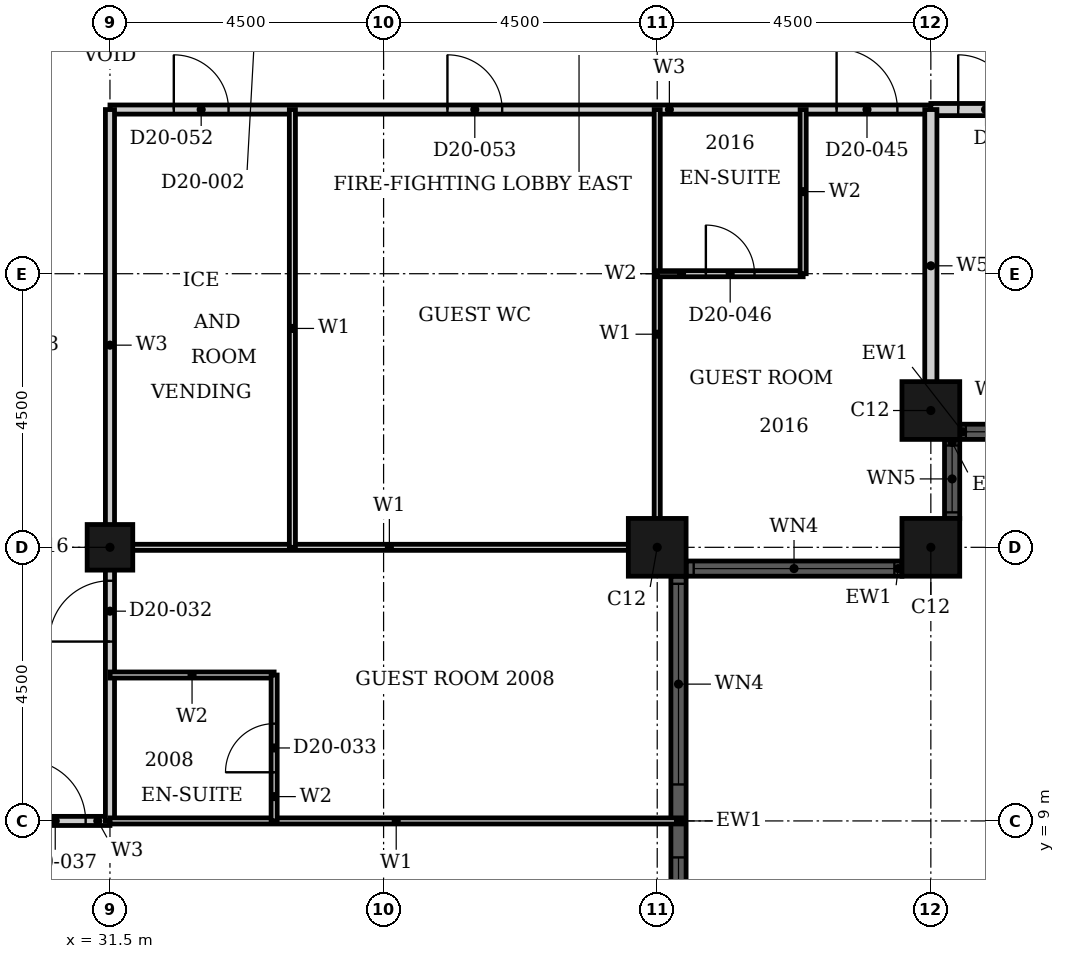
"""IFC4 building model, lengths in metres.
Left out: names, types, materials, properties, quantities, classifications, styles, units other than length and angle.
Written with IfcOpenShell. Run it as: python <this file> out.ifc"""

import sys

from ifc_helpers import new_model, si_unit, direction, frame, frame_2d, origin, origin_2d, place, context, subcontext, project, spatial, rectangle, hollow_rectangle, extrude, element, fill, save


model = new_model("IFC4")
c1 = context("Model", 3, precision=1e-05, world=origin(), true_north=direction((0.0, 1.0)))
c2 = subcontext(c1, "Body", "Model", "MODEL_VIEW")
j1 = project(units=[si_unit("LENGTHUNIT", "METRE"), si_unit("PLANEANGLEUNIT", "RADIAN")], contexts=[c1])
p1 = place(None, origin())
s1 = spatial("IfcSite", under=j1, at=p1, CompositionType="ELEMENT")
p2 = place(p1, origin())
s2 = spatial("IfcBuilding", under=s1, at=p2, CompositionType="ELEMENT")
p3 = place(p2, frame((0.0, 0.0, 85.2)))
s3 = spatial("IfcBuildingStorey", under=s2, at=p3, CompositionType="ELEMENT", Elevation=85.2)
for number, where, z_axis, x_axis in (
    (1, (40.5, 13.5, 0.0), (0.0, 0.0, 1.0), (1.0, 0.0, 0.0)),
    (2, (45.0, 13.5, 0.0), (0.0, 0.0, 1.0), (1.0, 0.0, 0.0)),
    (3, (45.0, 15.75, 0.0), (0.0, 0.0, 1.0), (1.0, 0.0, 0.0)),
):
    element("IfcColumn", number, at=place(p3, frame(where, z_axis=z_axis, x_axis=x_axis)), inside=s3, PredefinedType="COLUMN", context=c2, shape_type="SweptSolid", body=[
        extrude(hollow_rectangle(XDim=0.95, YDim=0.95, WallThickness=0.03, at=origin_2d()), origin(), (0.0, 0.0, 1.0), 3.6),
    ])
p4 = place(p3, frame((31.5, 13.5, 0.0), z_axis=(0.0, 0.0, 1.0), x_axis=(1.0, 0.0, 0.0)))
e4 = element("IfcColumn", 4, at=p4, inside=s3, PredefinedType="COLUMN", context=c2, shape_type="SweptSolid", body=[
    extrude(hollow_rectangle(XDim=0.75, YDim=0.75, WallThickness=0.024, at=origin_2d()), origin(), (0.0, 0.0, 1.0), 3.6),
])
p5 = place(p3, frame((40.85, 4.975, 0.0), z_axis=(0.0, 0.0, 1.0), x_axis=(0.0, 1.0, 0.0)))
e5 = element("IfcWall", 5, at=p5, inside=s3, PredefinedType="SOLIDWALL", context=c2, shape_type="SweptSolid", body=[
    extrude(rectangle(XDim=8.05, YDim=0.25, at=frame_2d((4.025, 0.0))), origin(), (0.0, 0.0, 1.0), 3.6),
])
p6 = place(p5, frame((0.125, 0.0, 0.9)))
e6 = element("IfcOpeningElement", 6, at=p6, cuts=e5, PredefinedType="OPENING", context=c2, shape_type="SweptSolid", body=[
    extrude(rectangle(XDim=3.3, YDim=2.08, at=frame_2d((1.65, 1.04))), frame((0.0, 0.135, 0.0), z_axis=(0.0, -1.0, 0.0), x_axis=(1.0, 0.0, 0.0)), (0.0, 0.0, 1.0), 0.27),
])
p7 = place(p5, frame((4.625, 0.0, 0.9)))
e7 = element("IfcOpeningElement", 7, at=p7, cuts=e5, PredefinedType="OPENING", context=c2, shape_type="SweptSolid", body=[
    extrude(rectangle(XDim=3.3, YDim=2.08, at=frame_2d((1.65, 1.04))), frame((0.0, 0.135, 0.0), z_axis=(0.0, -1.0, 0.0), x_axis=(1.0, 0.0, 0.0)), (0.0, 0.0, 1.0), 0.27),
])
p8 = place(p3, frame((40.975, 13.15, 0.0), z_axis=(0.0, 0.0, 1.0), x_axis=(1.0, 0.0, 0.0)))
e8 = element("IfcWall", 8, at=p8, inside=s3, PredefinedType="SOLIDWALL", context=c2, shape_type="SweptSolid", body=[
    extrude(rectangle(XDim=3.55, YDim=0.25, at=frame_2d((1.775, 0.0))), origin(), (0.0, 0.0, 1.0), 3.6),
])
p9 = place(p8, frame((0.125, 0.0, 0.9)))
e9 = element("IfcOpeningElement", 9, at=p9, cuts=e8, PredefinedType="OPENING", context=c2, shape_type="SweptSolid", body=[
    extrude(rectangle(XDim=3.3, YDim=2.08, at=frame_2d((1.65, 1.04))), frame((0.0, 0.135, 0.0), z_axis=(0.0, -1.0, 0.0), x_axis=(1.0, 0.0, 0.0)), (0.0, 0.0, 1.0), 0.27),
])
p10 = place(p3, frame((45.35, 13.975, 0.0), z_axis=(0.0, 0.0, 1.0), x_axis=(0.0, 1.0, 0.0)))
e10 = element("IfcWall", 10, at=p10, inside=s3, PredefinedType="SOLIDWALL", context=c2, shape_type="SweptSolid", body=[
    extrude(rectangle(XDim=1.3, YDim=0.25, at=frame_2d((0.65, 0.0))), origin(), (0.0, 0.0, 1.0), 3.6),
])
p11 = place(p10, frame((0.1, 0.0, 0.9)))
e11 = element("IfcOpeningElement", 11, at=p11, cuts=e10, PredefinedType="OPENING", context=c2, shape_type="SweptSolid", body=[
    extrude(rectangle(XDim=1.1, YDim=2.08, at=frame_2d((0.55, 1.04))), frame((0.0, 0.135, 0.0), z_axis=(0.0, -1.0, 0.0), x_axis=(1.0, 0.0, 0.0)), (0.0, 0.0, 1.0), 0.27),
])
p12 = place(p3, frame((45.475, 15.4, 0.0), z_axis=(0.0, 0.0, 1.0), x_axis=(1.0, 0.0, 0.0)))
e12 = element("IfcWall", 12, at=p12, inside=s3, PredefinedType="SOLIDWALL", context=c2, shape_type="SweptSolid", body=[
    extrude(rectangle(XDim=1.3, YDim=0.25, at=frame_2d((0.65, 0.0))), origin(), (0.0, 0.0, 1.0), 3.6),
])
p13 = place(p12, frame((0.1, 0.0, 0.9)))
e13 = element("IfcOpeningElement", 13, at=p13, cuts=e12, PredefinedType="OPENING", context=c2, shape_type="SweptSolid", body=[
    extrude(rectangle(XDim=1.1, YDim=2.08, at=frame_2d((0.55, 1.04))), frame((0.0, 0.135, 0.0), z_axis=(0.0, -1.0, 0.0), x_axis=(1.0, 0.0, 0.0)), (0.0, 0.0, 1.0), 0.27),
])
p14 = place(p3, frame((31.5, 20.7, 0.0), z_axis=(0.0, 0.0, 1.0), x_axis=(1.0, 0.0, 0.0)))
e14 = element("IfcWall", 14, at=p14, inside=s3, PredefinedType="PARTITIONING", context=c2, shape_type="SweptSolid", body=[
    extrude(rectangle(XDim=13.5, YDim=0.15, at=frame_2d((6.75, 0.0))), origin(), (0.0, 0.0, 1.0), 3.3),
])
p15 = place(p14, frame((11.95, 0.0, 0.0)))
e15 = element("IfcOpeningElement", 15, at=p15, cuts=e14, PredefinedType="OPENING", context=c2, shape_type="SweptSolid", body=[
    extrude(rectangle(XDim=1.0, YDim=2.1, at=frame_2d((0.5, 1.05))), frame((0.0, 0.085, 0.0), z_axis=(0.0, -1.0, 0.0), x_axis=(1.0, 0.0, 0.0)), (0.0, 0.0, 1.0), 0.17),
])
p16 = place(p14, frame((1.05, 0.0, 0.0)))
e16 = element("IfcOpeningElement", 16, at=p16, cuts=e14, PredefinedType="OPENING", context=c2, shape_type="SweptSolid", body=[
    extrude(rectangle(XDim=0.9, YDim=2.1, at=frame_2d((0.45, 1.05))), frame((0.0, 0.085, 0.0), z_axis=(0.0, -1.0, 0.0), x_axis=(1.0, 0.0, 0.0)), (0.0, 0.0, 1.0), 0.17),
])
p17 = place(p14, frame((5.55, 0.0, 0.0)))
e17 = element("IfcOpeningElement", 17, at=p17, cuts=e14, PredefinedType="OPENING", context=c2, shape_type="SweptSolid", body=[
    extrude(rectangle(XDim=0.9, YDim=2.1, at=frame_2d((0.45, 1.05))), frame((0.0, 0.085, 0.0), z_axis=(0.0, -1.0, 0.0), x_axis=(1.0, 0.0, 0.0)), (0.0, 0.0, 1.0), 0.17),
])
p18 = place(p3, frame((29.7, 9.0, 0.0), z_axis=(0.0, 0.0, 1.0), x_axis=(1.0, 0.0, 0.0)))
e18 = element("IfcWall", 18, at=p18, inside=s3, PredefinedType="PARTITIONING", context=c2, shape_type="SweptSolid", body=[
    extrude(rectangle(XDim=1.8, YDim=0.15, at=frame_2d((0.9, 0.0))), origin(), (0.0, 0.0, 1.0), 3.3),
])
p19 = place(p18, frame((0.4, 0.0, 0.0)))
e19 = element("IfcOpeningElement", 19, at=p19, cuts=e18, PredefinedType="OPENING", context=c2, shape_type="SweptSolid", body=[
    extrude(rectangle(XDim=1.0, YDim=2.1, at=frame_2d((0.5, 1.05))), frame((0.0, 0.085, 0.0), z_axis=(0.0, -1.0, 0.0), x_axis=(1.0, 0.0, 0.0)), (0.0, 0.0, 1.0), 0.17),
])
p20 = place(p3, frame((31.5, 9.0, 0.0), z_axis=(0.0, 0.0, 1.0), x_axis=(0.0, 1.0, 0.0)))
e20 = element("IfcWall", 20, at=p20, inside=s3, PredefinedType="PARTITIONING", context=c2, shape_type="SweptSolid", body=[
    extrude(rectangle(XDim=11.7, YDim=0.15, at=frame_2d((5.85, 0.0))), origin(), (0.0, 0.0, 1.0), 2.58),
])
p21 = place(p20, frame((2.95, 0.0, 0.0)))
e21 = element("IfcOpeningElement", 21, at=p21, cuts=e20, PredefinedType="OPENING", context=c2, shape_type="SweptSolid", body=[
    extrude(rectangle(XDim=1.0, YDim=2.1, at=frame_2d((0.5, 1.05))), frame((0.0, 0.085, 0.0), z_axis=(0.0, -1.0, 0.0), x_axis=(1.0, 0.0, 0.0)), (0.0, 0.0, 1.0), 0.17),
])
p22 = place(p3, frame((31.5, 13.5, 0.0), z_axis=(0.0, 0.0, 1.0), x_axis=(1.0, 0.0, 0.0)))
e22 = element("IfcWall", 22, at=p22, inside=s3, PredefinedType="PARTITIONING", context=c2, shape_type="SweptSolid", body=[
    extrude(rectangle(XDim=9.19, YDim=0.1, at=frame_2d((4.595, 0.0))), origin(), (0.0, 0.0, 1.0), 2.38),
])
p23 = place(p3, frame((31.5, 9.0, 0.0), z_axis=(0.0, 0.0, 1.0), x_axis=(1.0, 0.0, 0.0)))
e23 = element("IfcWall", 23, at=p23, inside=s3, PredefinedType="PARTITIONING", context=c2, shape_type="SweptSolid", body=[
    extrude(rectangle(XDim=9.415, YDim=0.1, at=frame_2d((4.708, 0.0))), origin(), (0.0, 0.0, 1.0), 3.3),
])
p24 = place(p3, frame((34.5, 13.5, 0.0), z_axis=(0.0, 0.0, 1.0), x_axis=(0.0, 1.0, 0.0)))
e24 = element("IfcWall", 24, at=p24, inside=s3, PredefinedType="PARTITIONING", context=c2, shape_type="SweptSolid", body=[
    extrude(rectangle(XDim=7.2, YDim=0.1, at=frame_2d((3.6, 0.0))), origin(), (0.0, 0.0, 1.0), 3.3),
])
p25 = place(p3, frame((40.5, 13.31, 0.0), z_axis=(0.0, 0.0, 1.0), x_axis=(0.0, 1.0, 0.0)))
e25 = element("IfcWall", 25, at=p25, inside=s3, PredefinedType="PARTITIONING", context=c2, shape_type="SweptSolid", body=[
    extrude(rectangle(XDim=7.39, YDim=0.1, at=frame_2d((3.695, 0.0))), origin(), (0.0, 0.0, 1.0), 3.3),
])
p26 = place(p3, frame((31.5, 11.4, 0.0), z_axis=(0.0, 0.0, 1.0), x_axis=(1.0, 0.0, 0.0)))
e26 = element("IfcWall", 26, at=p26, inside=s3, PredefinedType="PARTITIONING", context=c2, shape_type="SweptSolid", body=[
    extrude(rectangle(XDim=2.7, YDim=0.1, at=frame_2d((1.35, 0.0))), origin(), (0.0, 0.0, 1.0), 3.3),
])
p27 = place(p3, frame((40.5, 18.0, 0.0), z_axis=(0.0, 0.0, 1.0), x_axis=(1.0, 0.0, 0.0)))
e27 = element("IfcWall", 27, at=p27, inside=s3, PredefinedType="PARTITIONING", context=c2, shape_type="SweptSolid", body=[
    extrude(rectangle(XDim=2.4, YDim=0.1, at=frame_2d((1.2, 0.0))), origin(), (0.0, 0.0, 1.0), 3.3),
])
p28 = place(p27, frame((0.8, 0.0, 0.0)))
e28 = element("IfcOpeningElement", 28, at=p28, cuts=e27, PredefinedType="OPENING", context=c2, shape_type="SweptSolid", body=[
    extrude(rectangle(XDim=0.8, YDim=2.1, at=frame_2d((0.4, 1.05))), frame((0.0, 0.06, 0.0), z_axis=(0.0, -1.0, 0.0), x_axis=(1.0, 0.0, 0.0)), (0.0, 0.0, 1.0), 0.12),
])
p29 = place(p3, frame((34.2, 9.0, 0.0), z_axis=(0.0, 0.0, 1.0), x_axis=(0.0, 1.0, 0.0)))
e29 = element("IfcWall", 29, at=p29, inside=s3, PredefinedType="PARTITIONING", context=c2, shape_type="SweptSolid", body=[
    extrude(rectangle(XDim=2.4, YDim=0.1, at=frame_2d((1.2, 0.0))), origin(), (0.0, 0.0, 1.0), 3.3),
])
p30 = place(p29, frame((0.8, 0.0, 0.0)))
e30 = element("IfcOpeningElement", 30, at=p30, cuts=e29, PredefinedType="OPENING", context=c2, shape_type="SweptSolid", body=[
    extrude(rectangle(XDim=0.8, YDim=2.1, at=frame_2d((0.4, 1.05))), frame((0.0, 0.06, 0.0), z_axis=(0.0, -1.0, 0.0), x_axis=(1.0, 0.0, 0.0)), (0.0, 0.0, 1.0), 0.12),
])
p31 = place(p3, frame((42.9, 18.0, 0.0), z_axis=(0.0, 0.0, 1.0), x_axis=(0.0, 1.0, 0.0)))
e31 = element("IfcWall", 31, at=p31, inside=s3, PredefinedType="PARTITIONING", context=c2, shape_type="SweptSolid", body=[
    extrude(rectangle(XDim=2.7, YDim=0.1, at=frame_2d((1.35, 0.0))), origin(), (0.0, 0.0, 1.0), 3.3),
])
p32 = place(p3, frame((45.0, 20.7, 0.0), z_axis=(0.0, 0.0, 1.0), x_axis=(1.0, 0.0, 0.0)))
e32 = element("IfcWall", 32, at=p32, inside=s3, PredefinedType="PARTITIONING", context=c2, shape_type="SweptSolid", body=[
    extrude(rectangle(XDim=4.5, YDim=0.2, at=frame_2d((2.25, 0.0))), origin(), (0.0, 0.0, 1.0), 3.3),
])
p33 = place(p32, frame((0.45, 0.0, 0.0)))
e33 = element("IfcOpeningElement", 33, at=p33, cuts=e32, PredefinedType="OPENING", context=c2, shape_type="SweptSolid", body=[
    extrude(rectangle(XDim=0.9, YDim=2.1, at=frame_2d((0.45, 1.05))), frame((0.0, 0.11, 0.0), z_axis=(0.0, -1.0, 0.0), x_axis=(1.0, 0.0, 0.0)), (0.0, 0.0, 1.0), 0.22),
])
p34 = place(p3, frame((45.0, 15.56, 0.0), z_axis=(0.0, 0.0, 1.0), x_axis=(0.0, 1.0, 0.0)))
e34 = element("IfcWall", 34, at=p34, inside=s3, PredefinedType="PARTITIONING", context=c2, shape_type="SweptSolid", body=[
    extrude(rectangle(XDim=5.14, YDim=0.2, at=frame_2d((2.57, 0.0))), origin(), (0.0, 0.0, 1.0), 3.3),
])
p35 = place(p6, origin())
e35 = element("IfcWindow", 35, at=p35, inside=s3, PartitioningType="SINGLE_PANEL", PredefinedType="WINDOW", context=c2, shape_type="SweptSolid", body=[
    extrude(rectangle(XDim=3.3, YDim=2.08, at=frame_2d((1.65, 1.04))), frame((0.0, 0.03, 0.0), z_axis=(0.0, -1.0, 0.0), x_axis=(1.0, 0.0, 0.0)), (0.0, 0.0, 1.0), 0.06),
])
fill(e6, e35)
p36 = place(p7, origin())
e36 = element("IfcWindow", 36, at=p36, inside=s3, PartitioningType="SINGLE_PANEL", PredefinedType="WINDOW", context=c2, shape_type="SweptSolid", body=[
    extrude(rectangle(XDim=3.3, YDim=2.08, at=frame_2d((1.65, 1.04))), frame((0.0, 0.03, 0.0), z_axis=(0.0, -1.0, 0.0), x_axis=(1.0, 0.0, 0.0)), (0.0, 0.0, 1.0), 0.06),
])
fill(e7, e36)
p37 = place(p9, origin())
e37 = element("IfcWindow", 37, at=p37, inside=s3, PartitioningType="SINGLE_PANEL", PredefinedType="WINDOW", context=c2, shape_type="SweptSolid", body=[
    extrude(rectangle(XDim=3.3, YDim=2.08, at=frame_2d((1.65, 1.04))), frame((0.0, 0.03, 0.0), z_axis=(0.0, -1.0, 0.0), x_axis=(1.0, 0.0, 0.0)), (0.0, 0.0, 1.0), 0.06),
])
fill(e9, e37)
p38 = place(p11, origin())
e38 = element("IfcWindow", 38, at=p38, inside=s3, PartitioningType="SINGLE_PANEL", PredefinedType="WINDOW", context=c2, shape_type="SweptSolid", body=[
    extrude(rectangle(XDim=1.1, YDim=2.08, at=frame_2d((0.55, 1.04))), frame((0.0, 0.03, 0.0), z_axis=(0.0, -1.0, 0.0), x_axis=(1.0, 0.0, 0.0)), (0.0, 0.0, 1.0), 0.06),
])
fill(e11, e38)
p39 = place(p13, origin())
e39 = element("IfcWindow", 39, at=p39, inside=s3, PartitioningType="SINGLE_PANEL", PredefinedType="WINDOW", context=c2, shape_type="SweptSolid", body=[
    extrude(rectangle(XDim=1.1, YDim=2.08, at=frame_2d((0.55, 1.04))), frame((0.0, 0.03, 0.0), z_axis=(0.0, -1.0, 0.0), x_axis=(1.0, 0.0, 0.0)), (0.0, 0.0, 1.0), 0.06),
])
fill(e13, e39)
p40 = place(p21, origin())
e40 = element("IfcDoor", 40, at=p40, inside=s3, OperationType="SINGLE_SWING_RIGHT", PredefinedType="DOOR", context=c2, shape_type="SweptSolid", body=[
    extrude(rectangle(XDim=1.0, YDim=2.1, at=frame_2d((0.5, 1.05))), frame((0.0, 0.025, 0.0), z_axis=(0.0, -1.0, 0.0), x_axis=(1.0, 0.0, 0.0)), (0.0, 0.0, 1.0), 0.05),
])
fill(e21, e40)
p41 = place(p30, origin())
e41 = element("IfcDoor", 41, at=p41, inside=s3, OperationType="SINGLE_SWING_LEFT", PredefinedType="DOOR", context=c2, shape_type="SweptSolid", body=[
    extrude(rectangle(XDim=0.8, YDim=2.1, at=frame_2d((0.4, 1.05))), frame((0.0, 0.025, 0.0), z_axis=(0.0, -1.0, 0.0), x_axis=(1.0, 0.0, 0.0)), (0.0, 0.0, 1.0), 0.05),
])
fill(e30, e41)
p42 = place(p19, origin())
e42 = element("IfcDoor", 42, at=p42, inside=s3, OperationType="SINGLE_SWING_LEFT", PredefinedType="DOOR", context=c2, shape_type="SweptSolid", body=[
    extrude(rectangle(XDim=1.0, YDim=2.1, at=frame_2d((0.5, 1.05))), frame((0.0, 0.025, 0.0), z_axis=(0.0, -1.0, 0.0), x_axis=(1.0, 0.0, 0.0)), (0.0, 0.0, 1.0), 0.05),
])
fill(e19, e42)
p43 = place(p15, origin())
e43 = element("IfcDoor", 43, at=p43, inside=s3, OperationType="SINGLE_SWING_RIGHT", PredefinedType="DOOR", context=c2, shape_type="SweptSolid", body=[
    extrude(rectangle(XDim=1.0, YDim=2.1, at=frame_2d((0.5, 1.05))), frame((0.0, 0.025, 0.0), z_axis=(0.0, -1.0, 0.0), x_axis=(1.0, 0.0, 0.0)), (0.0, 0.0, 1.0), 0.05),
])
fill(e15, e43)
p44 = place(p28, origin())
e44 = element("IfcDoor", 44, at=p44, inside=s3, OperationType="SINGLE_SWING_RIGHT", PredefinedType="DOOR", context=c2, shape_type="SweptSolid", body=[
    extrude(rectangle(XDim=0.8, YDim=2.1, at=frame_2d((0.4, 1.05))), frame((0.0, 0.025, 0.0), z_axis=(0.0, -1.0, 0.0), x_axis=(1.0, 0.0, 0.0)), (0.0, 0.0, 1.0), 0.05),
])
fill(e28, e44)
p45 = place(p33, origin())
e45 = element("IfcDoor", 45, at=p45, inside=s3, OperationType="SINGLE_SWING_LEFT", PredefinedType="DOOR", context=c2, shape_type="SweptSolid", body=[
    extrude(rectangle(XDim=0.9, YDim=2.1, at=frame_2d((0.45, 1.05))), frame((0.0, 0.025, 0.0), z_axis=(0.0, -1.0, 0.0), x_axis=(1.0, 0.0, 0.0)), (0.0, 0.0, 1.0), 0.05),
])
fill(e33, e45)
p46 = place(p16, origin())
e46 = element("IfcDoor", 46, at=p46, inside=s3, OperationType="SINGLE_SWING_RIGHT", PredefinedType="DOOR", context=c2, shape_type="SweptSolid", body=[
    extrude(rectangle(XDim=0.9, YDim=2.1, at=frame_2d((0.45, 1.05))), frame((0.0, 0.025, 0.0), z_axis=(0.0, -1.0, 0.0), x_axis=(1.0, 0.0, 0.0)), (0.0, 0.0, 1.0), 0.05),
])
fill(e16, e46)
p47 = place(p17, origin())
e47 = element("IfcDoor", 47, at=p47, inside=s3, OperationType="SINGLE_SWING_LEFT", PredefinedType="DOOR", context=c2, shape_type="SweptSolid", body=[
    extrude(rectangle(XDim=0.9, YDim=2.1, at=frame_2d((0.45, 1.05))), frame((0.0, 0.025, 0.0), z_axis=(0.0, -1.0, 0.0), x_axis=(1.0, 0.0, 0.0)), (0.0, 0.0, 1.0), 0.05),
])
fill(e17, e47)
save(model, sys.argv[1])
